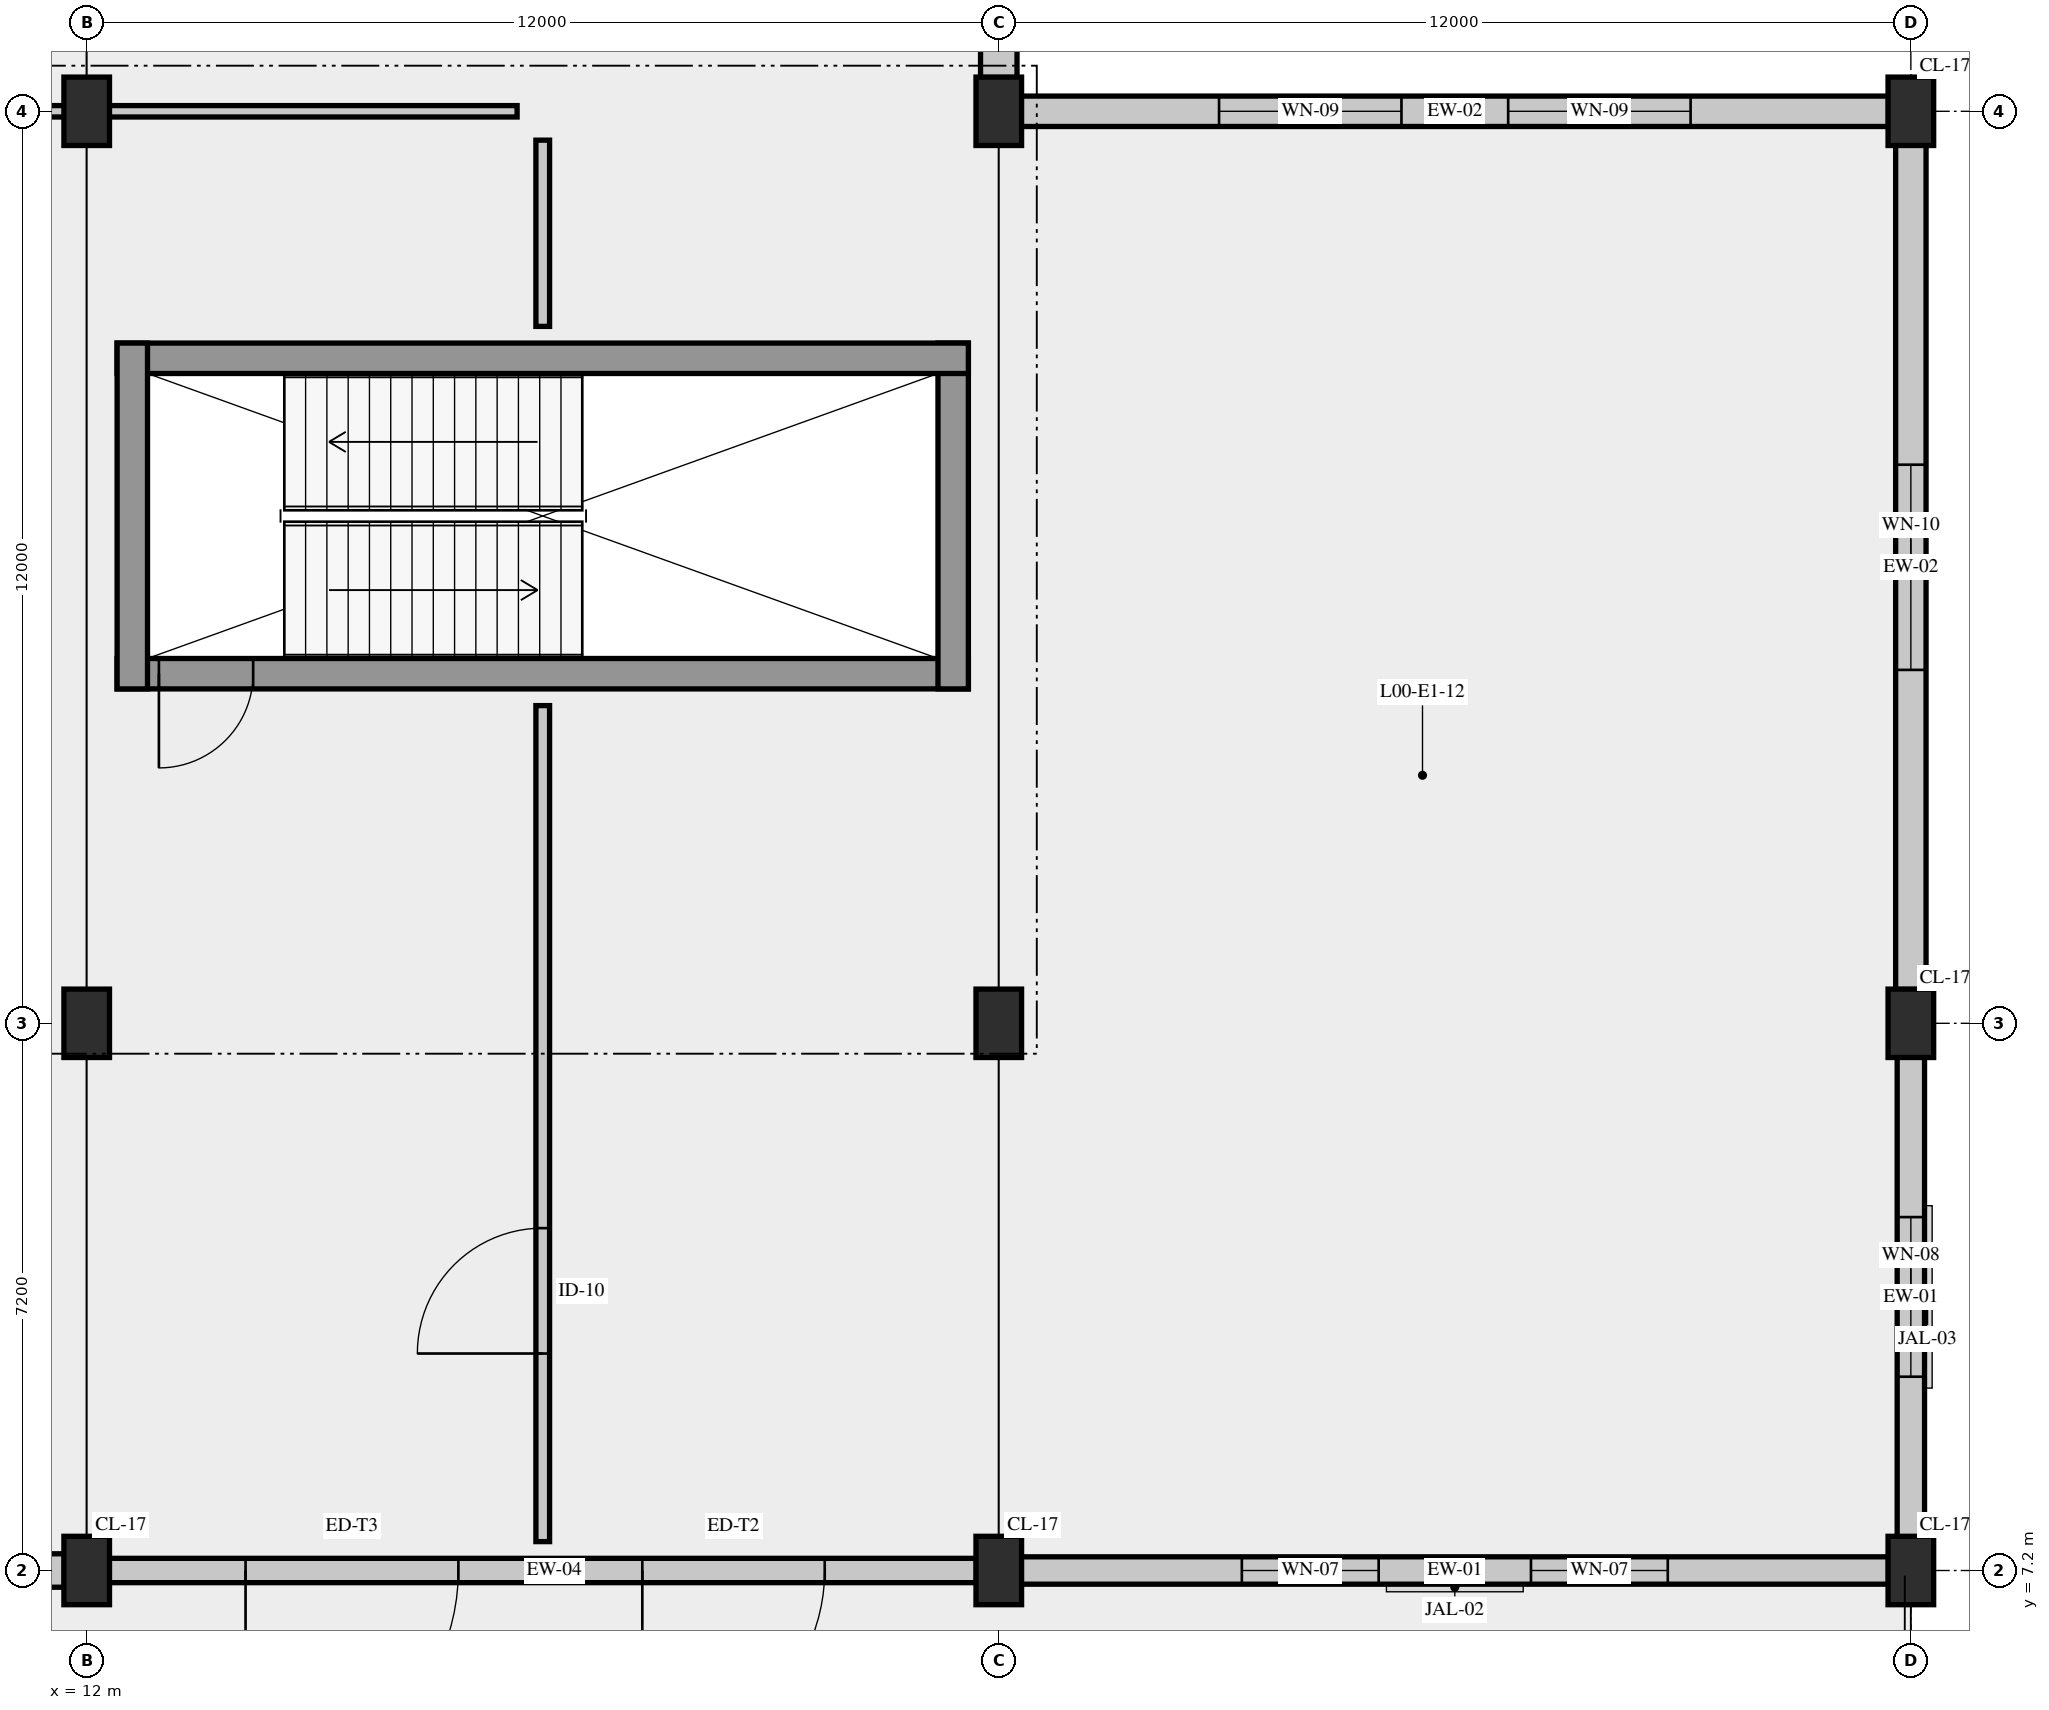
"""IFC4 building model, lengths in metres.
Left out: names, types, materials, properties, quantities, classifications, styles, units other than length and angle.
Written with IfcOpenShell. Run it as: python <this file> out.ifc"""

import sys

from ifc_helpers import new_model, si_unit, direction, frame, frame_2d, origin, origin_2d, place, context, subcontext, project, spatial, rectangle, extrude, element, fill, save


model = new_model("IFC4")
c1 = context("Model", 3, precision=1e-05, world=origin(), true_north=direction((0.0, 1.0)))
c2 = subcontext(c1, "Body", "Model", "MODEL_VIEW")
j1 = project(units=[si_unit("LENGTHUNIT", "METRE"), si_unit("PLANEANGLEUNIT", "RADIAN")], contexts=[c1])
p1 = place(None, origin())
s1 = spatial("IfcSite", under=j1, at=p1, CompositionType="ELEMENT")
p2 = place(p1, origin())
s2 = spatial("IfcBuilding", under=s1, at=p2, CompositionType="ELEMENT")
p3 = place(p2, origin())
s3 = spatial("IfcBuildingStorey", under=s2, at=p3, CompositionType="ELEMENT", Elevation=0.0)
for number, where, z_axis, x_axis in (
    (1, (12.0, 7.2, 0.0), (0.0, 0.0, 1.0), (1.0, 0.0, 0.0)),
    (2, (12.0, 14.4, 0.0), (0.0, 0.0, 1.0), (1.0, 0.0, 0.0)),
    (3, (12.0, 26.4, 0.0), (0.0, 0.0, 1.0), (1.0, 0.0, 0.0)),
    (4, (24.0, 7.2, 0.0), (0.0, 0.0, 1.0), (1.0, 0.0, 0.0)),
    (5, (24.0, 14.4, 0.0), (0.0, 0.0, 1.0), (1.0, 0.0, 0.0)),
    (6, (24.0, 26.4, 0.0), (0.0, 0.0, 1.0), (1.0, 0.0, 0.0)),
    (7, (36.0, 7.2, 0.0), (0.0, 0.0, 1.0), (1.0, 0.0, 0.0)),
    (8, (36.0, 14.4, 0.0), (0.0, 0.0, 1.0), (1.0, 0.0, 0.0)),
    (9, (36.0, 26.4, 0.0), (0.0, 0.0, 1.0), (1.0, 0.0, 0.0)),
):
    element("IfcColumn", number, at=place(p3, frame(where, z_axis=z_axis, x_axis=x_axis)), inside=s3, PredefinedType="COLUMN", context=c2, shape_type="SweptSolid", body=[
        extrude(rectangle(XDim=0.6, YDim=0.9, at=origin_2d()), origin(), (0.0, 0.0, 1.0), 5.4),
    ])
p4 = place(p3, frame((0.295, 7.2, 0.0), z_axis=(0.0, 0.0, 1.0), x_axis=(1.0, 0.0, 0.0)))
e10 = element("IfcWall", 10, at=p4, inside=s3, PredefinedType="SOLIDWALL", context=c2, shape_type="SweptSolid", body=[
    extrude(rectangle(XDim=11.41, YDim=0.44, at=frame_2d((5.705, 0.0))), origin(), (0.0, 0.0, 1.0), 4.56),
])
p5 = place(p4, frame((3.278, 0.0, 0.95)))
e11 = element("IfcOpeningElement", 11, at=p5, cuts=e10, PredefinedType="OPENING", context=c2, shape_type="SweptSolid", body=[
    extrude(rectangle(XDim=1.05, YDim=1.5, at=frame_2d((0.525, 0.75))), frame((0.0, 0.23, 0.0), z_axis=(0.0, -1.0, 0.0), x_axis=(1.0, 0.0, 0.0)), (0.0, 0.0, 1.0), 0.46),
])
p6 = place(p4, frame((7.082, 0.0, 0.95)))
e12 = element("IfcOpeningElement", 12, at=p6, cuts=e10, PredefinedType="OPENING", context=c2, shape_type="SweptSolid", body=[
    extrude(rectangle(XDim=1.05, YDim=1.5, at=frame_2d((0.525, 0.75))), frame((0.0, 0.23, 0.0), z_axis=(0.0, -1.0, 0.0), x_axis=(1.0, 0.0, 0.0)), (0.0, 0.0, 1.0), 0.46),
])
p7 = place(p3, frame((12.295, 7.2, 0.0), z_axis=(0.0, 0.0, 1.0), x_axis=(1.0, 0.0, 0.0)))
e13 = element("IfcWall", 13, at=p7, inside=s3, PredefinedType="SOLIDWALL", context=c2, shape_type="SweptSolid", body=[
    extrude(rectangle(XDim=11.41, YDim=0.32, at=frame_2d((5.705, 0.0))), origin(), (0.0, 0.0, 1.0), 4.56),
])
p8 = place(p7, frame((1.795, 0.0, 0.0)))
e14 = element("IfcOpeningElement", 14, at=p8, cuts=e13, PredefinedType="OPENING", context=c2, shape_type="SweptSolid", body=[
    extrude(rectangle(XDim=2.8, YDim=2.8, at=frame_2d((1.4, 1.4))), frame((0.0, 0.17, 0.0), z_axis=(0.0, -1.0, 0.0), x_axis=(1.0, 0.0, 0.0)), (0.0, 0.0, 1.0), 0.34),
])
p9 = place(p7, frame((7.015, 0.0, 0.0)))
e15 = element("IfcOpeningElement", 15, at=p9, cuts=e13, PredefinedType="OPENING", context=c2, shape_type="SweptSolid", body=[
    extrude(rectangle(XDim=2.4, YDim=2.6, at=frame_2d((1.2, 1.3))), frame((0.0, 0.17, 0.0), z_axis=(0.0, -1.0, 0.0), x_axis=(1.0, 0.0, 0.0)), (0.0, 0.0, 1.0), 0.34),
])
p10 = place(p3, frame((24.0, 26.845, 0.0), z_axis=(0.0, 0.0, 1.0), x_axis=(0.0, 1.0, 0.0)))
e16 = element("IfcWall", 16, at=p10, inside=s3, PredefinedType="SOLIDWALL", context=c2, shape_type="SweptSolid", body=[
    extrude(rectangle(XDim=11.555, YDim=0.48, at=frame_2d((5.777, 0.0))), origin(), (0.0, 0.0, 1.0), 4.21),
])
p11 = place(p3, frame((24.295, 7.2, 0.0), z_axis=(0.0, 0.0, 1.0), x_axis=(1.0, 0.0, 0.0)))
e17 = element("IfcWall", 17, at=p11, inside=s3, PredefinedType="SOLIDWALL", context=c2, shape_type="SweptSolid", body=[
    extrude(rectangle(XDim=11.41, YDim=0.36, at=frame_2d((5.705, 0.0))), origin(), (0.0, 0.0, 1.0), 4.56),
])
p12 = place(p11, frame((2.903, 0.0, 0.95)))
e18 = element("IfcOpeningElement", 18, at=p12, cuts=e17, PredefinedType="OPENING", context=c2, shape_type="SweptSolid", body=[
    extrude(rectangle(XDim=1.8, YDim=1.5, at=frame_2d((0.9, 0.75))), frame((0.0, 0.19, 0.0), z_axis=(0.0, -1.0, 0.0), x_axis=(1.0, 0.0, 0.0)), (0.0, 0.0, 1.0), 0.38),
])
p13 = place(p11, frame((6.707, 0.0, 0.95)))
e19 = element("IfcOpeningElement", 19, at=p13, cuts=e17, PredefinedType="OPENING", context=c2, shape_type="SweptSolid", body=[
    extrude(rectangle(XDim=1.8, YDim=1.5, at=frame_2d((0.9, 0.75))), frame((0.0, 0.19, 0.0), z_axis=(0.0, -1.0, 0.0), x_axis=(1.0, 0.0, 0.0)), (0.0, 0.0, 1.0), 0.38),
])
p14 = place(p3, frame((36.0, 7.645, 0.0), z_axis=(0.0, 0.0, 1.0), x_axis=(0.0, 1.0, 0.0)))
e20 = element("IfcWall", 20, at=p14, inside=s3, PredefinedType="SOLIDWALL", context=c2, shape_type="SweptSolid", body=[
    extrude(rectangle(XDim=6.31, YDim=0.36, at=frame_2d((3.155, 0.0))), origin(), (0.0, 0.0, 1.0), 4.56),
])
p15 = place(p14, frame((2.105, 0.0, 0.95)))
e21 = element("IfcOpeningElement", 21, at=p15, cuts=e20, PredefinedType="OPENING", context=c2, shape_type="SweptSolid", body=[
    extrude(rectangle(XDim=2.1, YDim=1.5, at=frame_2d((1.05, 0.75))), frame((0.0, 0.19, 0.0), z_axis=(0.0, -1.0, 0.0), x_axis=(1.0, 0.0, 0.0)), (0.0, 0.0, 1.0), 0.38),
])
p16 = place(p3, frame((35.705, 26.4, 0.0), z_axis=(0.0, 0.0, 1.0), x_axis=(-1.0, 0.0, 0.0)))
e22 = element("IfcWall", 22, at=p16, inside=s3, PredefinedType="SOLIDWALL", context=c2, shape_type="SweptSolid", body=[
    extrude(rectangle(XDim=11.41, YDim=0.4, at=frame_2d((5.705, 0.0))), origin(), (0.0, 0.0, 1.0), 4.56),
])
p17 = place(p16, frame((2.603, 0.0, 0.95)))
e23 = element("IfcOpeningElement", 23, at=p17, cuts=e22, PredefinedType="OPENING", context=c2, shape_type="SweptSolid", body=[
    extrude(rectangle(XDim=2.4, YDim=1.5, at=frame_2d((1.2, 0.75))), frame((0.0, 0.21, 0.0), z_axis=(0.0, -1.0, 0.0), x_axis=(1.0, 0.0, 0.0)), (0.0, 0.0, 1.0), 0.42),
])
p18 = place(p16, frame((6.407, 0.0, 0.95)))
e24 = element("IfcOpeningElement", 24, at=p18, cuts=e22, PredefinedType="OPENING", context=c2, shape_type="SweptSolid", body=[
    extrude(rectangle(XDim=2.4, YDim=1.5, at=frame_2d((1.2, 0.75))), frame((0.0, 0.21, 0.0), z_axis=(0.0, -1.0, 0.0), x_axis=(1.0, 0.0, 0.0)), (0.0, 0.0, 1.0), 0.42),
])
p19 = place(p3, frame((36.0, 14.845, 0.0), z_axis=(0.0, 0.0, 1.0), x_axis=(0.0, 1.0, 0.0)))
e25 = element("IfcWall", 25, at=p19, inside=s3, PredefinedType="SOLIDWALL", context=c2, shape_type="SweptSolid", body=[
    extrude(rectangle(XDim=11.11, YDim=0.4, at=frame_2d((5.555, 0.0))), origin(), (0.0, 0.0, 1.0), 4.56),
])
p20 = place(p19, frame((4.205, 0.0, 0.95)))
e26 = element("IfcOpeningElement", 26, at=p20, cuts=e25, PredefinedType="OPENING", context=c2, shape_type="SweptSolid", body=[
    extrude(rectangle(XDim=2.7, YDim=1.5, at=frame_2d((1.35, 0.75))), frame((0.0, 0.21, 0.0), z_axis=(0.0, -1.0, 0.0), x_axis=(1.0, 0.0, 0.0)), (0.0, 0.0, 1.0), 0.42),
])
p21 = place(p3, frame((12.4, 19.0, 0.0), z_axis=(0.0, 0.0, 1.0), x_axis=(1.0, 0.0, 0.0)))
e27 = element("IfcWall", 27, at=p21, inside=s3, PredefinedType="SHEAR", context=c2, shape_type="SweptSolid", body=[
    extrude(rectangle(XDim=11.2, YDim=0.4, at=frame_2d((5.6, 0.0))), origin(), (0.0, 0.0, 1.0), 5.14),
])
p22 = place(p21, frame((0.55, 0.0, 0.0)))
e28 = element("IfcOpeningElement", 28, at=p22, cuts=e27, PredefinedType="OPENING", context=c2, shape_type="SweptSolid", body=[
    extrude(rectangle(XDim=1.24, YDim=2.25, at=frame_2d((0.62, 1.125))), frame((0.0, 0.21, 0.0), z_axis=(0.0, -1.0, 0.0), x_axis=(1.0, 0.0, 0.0)), (0.0, 0.0, 1.0), 0.42),
])
p23 = place(p3, frame((23.4, 18.8, 0.0), z_axis=(0.0, 0.0, 1.0), x_axis=(0.0, 1.0, 0.0)))
e29 = element("IfcWall", 29, at=p23, inside=s3, PredefinedType="SHEAR", context=c2, shape_type="SweptSolid", body=[
    extrude(rectangle(XDim=4.55, YDim=0.4, at=frame_2d((2.275, 0.0))), origin(), (0.0, 0.0, 1.0), 5.14),
])
p24 = place(p3, frame((23.6, 23.15, 0.0), z_axis=(0.0, 0.0, 1.0), x_axis=(-1.0, 0.0, 0.0)))
e30 = element("IfcWall", 30, at=p24, inside=s3, PredefinedType="SHEAR", context=c2, shape_type="SweptSolid", body=[
    extrude(rectangle(XDim=11.2, YDim=0.4, at=frame_2d((5.6, 0.0))), origin(), (0.0, 0.0, 1.0), 5.14),
])
p25 = place(p3, frame((12.6, 23.35, 0.0), z_axis=(0.0, 0.0, 1.0), x_axis=(0.0, -1.0, 0.0)))
e31 = element("IfcWall", 31, at=p25, inside=s3, PredefinedType="SHEAR", context=c2, shape_type="SweptSolid", body=[
    extrude(rectangle(XDim=4.55, YDim=0.4, at=frame_2d((2.275, 0.0))), origin(), (0.0, 0.0, 1.0), 5.14),
])
p26 = place(p3, frame((18.0, 7.58, 0.0), z_axis=(0.0, 0.0, 1.0), x_axis=(0.0, 1.0, 0.0)))
e32 = element("IfcWall", 32, at=p26, inside=s3, PredefinedType="PARTITIONING", context=c2, shape_type="SweptSolid", body=[
    extrude(rectangle(XDim=11.0, YDim=0.18, at=frame_2d((5.5, 0.0))), origin(), (0.0, 0.0, 1.0), 4.57),
])
p27 = place(p26, frame((2.475, 0.0, 0.0)))
e33 = element("IfcOpeningElement", 33, at=p27, cuts=e32, PredefinedType="OPENING", context=c2, shape_type="SweptSolid", body=[
    extrude(rectangle(XDim=1.65, YDim=2.35, at=frame_2d((0.825, 1.175))), frame((0.0, 0.1, 0.0), z_axis=(0.0, -1.0, 0.0), x_axis=(1.0, 0.0, 0.0)), (0.0, 0.0, 1.0), 0.2),
])
p28 = place(p3, frame((18.0, 23.57, 0.0), z_axis=(0.0, 0.0, 1.0), x_axis=(0.0, 1.0, 0.0)))
e34 = element("IfcWall", 34, at=p28, inside=s3, PredefinedType="PARTITIONING", context=c2, shape_type="SweptSolid", body=[
    extrude(rectangle(XDim=2.45, YDim=0.18, at=frame_2d((1.225, 0.0))), origin(), (0.0, 0.0, 1.0), 5.12),
])
p29 = place(p3, frame((0.594, 26.4, 0.0), z_axis=(0.0, 0.0, 1.0), x_axis=(1.0, 0.0, 0.0)))
e35 = element("IfcWall", 35, at=p29, inside=s3, PredefinedType="PARTITIONING", context=c2, shape_type="SweptSolid", body=[
    extrude(rectangle(XDim=17.068, YDim=0.15, at=frame_2d((8.534, 0.0))), origin(), (0.0, 0.0, 1.0), 4.57),
])
p30 = place(p29, frame((4.22, 0.0, 0.0)))
e36 = element("IfcOpeningElement", 36, at=p30, cuts=e35, PredefinedType="OPENING", context=c2, shape_type="SweptSolid", body=[
    extrude(rectangle(XDim=1.8, YDim=2.4, at=frame_2d((0.9, 1.2))), frame((0.0, 0.085, 0.0), z_axis=(0.0, -1.0, 0.0), x_axis=(1.0, 0.0, 0.0)), (0.0, 0.0, 1.0), 0.17),
])
p31 = place(p8, frame((2.8, 0.0, 0.0), z_axis=(0.0, 0.0, 1.0), x_axis=(-1.0, 0.0, 0.0)))
e37 = element("IfcDoor", 37, at=p31, inside=s3, OperationType="DOUBLE_DOOR_SINGLE_SWING", PredefinedType="DOOR", context=c2, shape_type="SweptSolid", body=[
    extrude(rectangle(XDim=2.8, YDim=2.8, at=frame_2d((1.4, 1.4))), frame((0.0, 0.025, 0.0), z_axis=(0.0, -1.0, 0.0), x_axis=(1.0, 0.0, 0.0)), (0.0, 0.0, 1.0), 0.05),
])
fill(e14, e37)
p32 = place(p9, frame((2.4, 0.0, 0.0), z_axis=(0.0, 0.0, 1.0), x_axis=(-1.0, 0.0, 0.0)))
e38 = element("IfcDoor", 38, at=p32, inside=s3, OperationType="DOUBLE_DOOR_SINGLE_SWING", PredefinedType="DOOR", context=c2, shape_type="SweptSolid", body=[
    extrude(rectangle(XDim=2.4, YDim=2.6, at=frame_2d((1.2, 1.3))), frame((0.0, 0.025, 0.0), z_axis=(0.0, -1.0, 0.0), x_axis=(1.0, 0.0, 0.0)), (0.0, 0.0, 1.0), 0.05),
])
fill(e15, e38)
p33 = place(p12, origin())
e39 = element("IfcWindow", 39, at=p33, inside=s3, PartitioningType="SINGLE_PANEL", PredefinedType="WINDOW", context=c2, shape_type="SweptSolid", body=[
    extrude(rectangle(XDim=1.8, YDim=1.5, at=frame_2d((0.9, 0.75))), frame((0.0, 0.03, 0.0), z_axis=(0.0, -1.0, 0.0), x_axis=(1.0, 0.0, 0.0)), (0.0, 0.0, 1.0), 0.06),
])
fill(e18, e39)
p34 = place(p13, origin())
e40 = element("IfcWindow", 40, at=p34, inside=s3, PartitioningType="SINGLE_PANEL", PredefinedType="WINDOW", context=c2, shape_type="SweptSolid", body=[
    extrude(rectangle(XDim=1.8, YDim=1.5, at=frame_2d((0.9, 0.75))), frame((0.0, 0.03, 0.0), z_axis=(0.0, -1.0, 0.0), x_axis=(1.0, 0.0, 0.0)), (0.0, 0.0, 1.0), 0.06),
])
fill(e19, e40)
p35 = place(p15, origin())
e41 = element("IfcWindow", 41, at=p35, inside=s3, PartitioningType="SINGLE_PANEL", PredefinedType="WINDOW", context=c2, shape_type="SweptSolid", body=[
    extrude(rectangle(XDim=2.1, YDim=1.5, at=frame_2d((1.05, 0.75))), frame((0.0, 0.03, 0.0), z_axis=(0.0, -1.0, 0.0), x_axis=(1.0, 0.0, 0.0)), (0.0, 0.0, 1.0), 0.06),
])
fill(e21, e41)
p36 = place(p17, origin())
e42 = element("IfcWindow", 42, at=p36, inside=s3, PartitioningType="SINGLE_PANEL", PredefinedType="WINDOW", context=c2, shape_type="SweptSolid", body=[
    extrude(rectangle(XDim=2.4, YDim=1.5, at=frame_2d((1.2, 0.75))), frame((0.0, 0.03, 0.0), z_axis=(0.0, -1.0, 0.0), x_axis=(1.0, 0.0, 0.0)), (0.0, 0.0, 1.0), 0.06),
])
fill(e23, e42)
p37 = place(p18, origin())
e43 = element("IfcWindow", 43, at=p37, inside=s3, PartitioningType="SINGLE_PANEL", PredefinedType="WINDOW", context=c2, shape_type="SweptSolid", body=[
    extrude(rectangle(XDim=2.4, YDim=1.5, at=frame_2d((1.2, 0.75))), frame((0.0, 0.03, 0.0), z_axis=(0.0, -1.0, 0.0), x_axis=(1.0, 0.0, 0.0)), (0.0, 0.0, 1.0), 0.06),
])
fill(e24, e43)
p38 = place(p20, origin())
e44 = element("IfcWindow", 44, at=p38, inside=s3, PartitioningType="SINGLE_PANEL", PredefinedType="WINDOW", context=c2, shape_type="SweptSolid", body=[
    extrude(rectangle(XDim=2.7, YDim=1.5, at=frame_2d((1.35, 0.75))), frame((0.0, 0.03, 0.0), z_axis=(0.0, -1.0, 0.0), x_axis=(1.0, 0.0, 0.0)), (0.0, 0.0, 1.0), 0.06),
])
fill(e26, e44)
p39 = place(p22, frame((1.24, 0.0, 0.0), z_axis=(0.0, 0.0, 1.0), x_axis=(-1.0, 0.0, 0.0)))
e45 = element("IfcDoor", 45, at=p39, inside=s3, OperationType="SINGLE_SWING_LEFT", PredefinedType="DOOR", context=c2, shape_type="SweptSolid", body=[
    extrude(rectangle(XDim=1.24, YDim=2.25, at=frame_2d((0.62, 1.125))), frame((0.0, 0.025, 0.0), z_axis=(0.0, -1.0, 0.0), x_axis=(1.0, 0.0, 0.0)), (0.0, 0.0, 1.0), 0.05),
])
fill(e28, e45)
p40 = place(p27, origin())
e46 = element("IfcDoor", 46, at=p40, inside=s3, OperationType="DOUBLE_DOOR_SINGLE_SWING", PredefinedType="DOOR", context=c2, shape_type="SweptSolid", body=[
    extrude(rectangle(XDim=1.65, YDim=2.35, at=frame_2d((0.825, 1.175))), frame((0.0, 0.025, 0.0), z_axis=(0.0, -1.0, 0.0), x_axis=(1.0, 0.0, 0.0)), (0.0, 0.0, 1.0), 0.05),
])
fill(e33, e46)
save(model, sys.argv[1])
